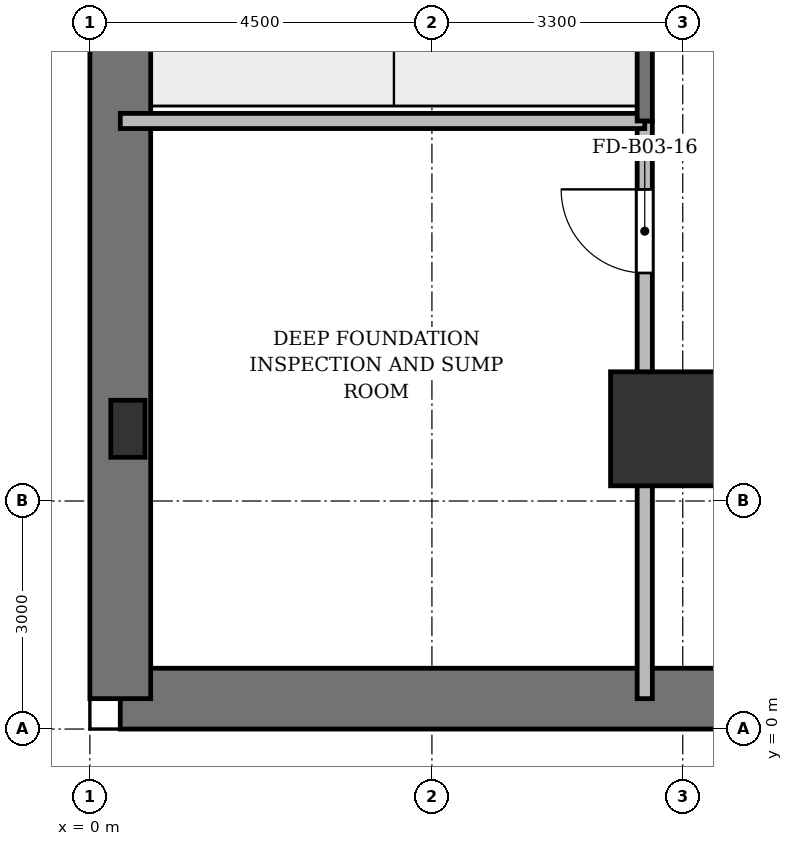
"""IFC4 building model, lengths in metres.
Left out: names, types, materials, properties, quantities, classifications, styles, units other than length and angle.
Written with IfcOpenShell. Run it as: python <this file> out.ifc"""

import sys

from ifc_helpers import new_model, si_unit, direction, frame, frame_2d, origin, origin_2d, place, context, subcontext, project, spatial, rectangle, extrude, source, transform, mapped, element, fill, save


model = new_model("IFC4")
c1 = context("Model", 3, precision=1e-05, world=origin(), true_north=direction((0.0, 1.0)))
c2 = subcontext(c1, "Body", "Model", "MODEL_VIEW")
j1 = project(units=[si_unit("LENGTHUNIT", "METRE"), si_unit("PLANEANGLEUNIT", "RADIAN")], contexts=[c1])
p1 = place(None, origin())
s1 = spatial("IfcSite", under=j1, at=p1, CompositionType="ELEMENT")
p2 = place(p1, origin())
s2 = spatial("IfcBuilding", under=s1, at=p2, CompositionType="ELEMENT")
p3 = place(p2, frame((0.0, 0.0, -13.2)))
s3 = spatial("IfcBuildingStorey", under=s2, at=p3, CompositionType="ELEMENT", Elevation=-13.2)
m1 = source(origin(), c2, "Body", "SweptSolid", [
    extrude(rectangle(XDim=0.45, YDim=0.75, at=origin_2d()), origin(), (0.0, 0.0, 1.0), 4.6),
])
p4 = place(p3, frame((0.5, 3.95, 0.0), z_axis=(0.0, 0.0, 1.0), x_axis=(1.0, 0.0, 0.0)))
e1 = element("IfcColumn", 1, at=p4, inside=s3, PredefinedType="PILASTER", context=c2, shape_type="MappedRepresentation", body=[
    mapped(m1, transform((0.0, 0.0, 0.0), x_axis=(1.0, 0.0, 0.0), y_axis=(0.0, 1.0, 0.0), z_axis=(0.0, 0.0, 1.0), scale=1.0)),
])
m2 = source(origin(), c2, "Body", "SweptSolid", [
    extrude(rectangle(XDim=1.5, YDim=1.5, at=origin_2d()), origin(), (0.0, 0.0, 1.0), 4.6),
])
p5 = place(p3, frame((7.6, 3.95, 0.0), z_axis=(0.0, 0.0, 1.0), x_axis=(1.0, 0.0, 0.0)))
e2 = element("IfcColumn", 2, at=p5, inside=s3, PredefinedType="COLUMN", context=c2, shape_type="MappedRepresentation", body=[
    mapped(m2, transform((0.0, 0.0, 0.0), x_axis=(1.0, 0.0, 0.0), y_axis=(0.0, 1.0, 0.0), z_axis=(0.0, 0.0, 1.0), scale=1.0)),
])
p6 = place(p3, frame((0.4, 0.4, 0.0), z_axis=(0.0, 0.0, 1.0), x_axis=(1.0, 0.0, 0.0)))
e3 = element("IfcWall", 3, at=p6, inside=s3, PredefinedType="USERDEFINED", context=c2, shape_type="SweptSolid", body=[
    extrude(rectangle(XDim=73.6, YDim=0.8, at=frame_2d((36.8, 0.0))), origin(), (0.0, 0.0, 1.0), 4.28),
])
p7 = place(p3, frame((0.4, 51.2, 0.0), z_axis=(0.0, 0.0, 1.0), x_axis=(0.0, -1.0, 0.0)))
e4 = element("IfcWall", 4, at=p7, inside=s3, PredefinedType="USERDEFINED", context=c2, shape_type="SweptSolid", body=[
    extrude(rectangle(XDim=50.8, YDim=0.8, at=frame_2d((25.4, 0.0))), origin(), (0.0, 0.0, 1.0), 4.28),
])
p8 = place(p3, frame((7.3, 0.4, 0.0), z_axis=(0.0, 0.0, 1.0), x_axis=(0.0, 1.0, 0.0)))
e5 = element("IfcWall", 5, at=p8, inside=s3, PredefinedType="PARTITIONING", context=c2, shape_type="SweptSolid", body=[
    extrude(rectangle(XDim=7.6, YDim=0.2, at=frame_2d((3.8, 0.0))), origin(), (0.0, 0.0, 1.0), 3.38),
])
p9 = place(p8, frame((5.6, 0.0, 0.0)))
e6 = element("IfcOpeningElement", 6, at=p9, cuts=e5, PredefinedType="OPENING", context=c2, shape_type="SweptSolid", body=[
    extrude(rectangle(XDim=1.1, YDim=2.15, at=frame_2d((0.55, 1.075))), frame((0.0, 0.11, 0.0), z_axis=(0.0, -1.0, 0.0), x_axis=(1.0, 0.0, 0.0)), (0.0, 0.0, 1.0), 0.22),
])
p10 = place(p3, frame((0.4, 8.0, 0.0), z_axis=(0.0, 0.0, 1.0), x_axis=(1.0, 0.0, 0.0)))
e7 = element("IfcWall", 7, at=p10, inside=s3, PredefinedType="PARTITIONING", context=c2, shape_type="SweptSolid", body=[
    extrude(rectangle(XDim=6.9, YDim=0.2, at=frame_2d((3.45, 0.0))), origin(), (0.0, 0.0, 1.0), 4.28),
])
p11 = place(p3, frame((7.3, 8.0, 0.0), z_axis=(0.0, 0.0, 1.0), x_axis=(0.0, 1.0, 0.0)))
e8 = element("IfcWall", 8, at=p11, inside=s3, PredefinedType="SHEAR", context=c2, shape_type="SweptSolid", body=[
    extrude(rectangle(XDim=36.45, YDim=0.2, at=frame_2d((18.225, 0.0))), origin(), (0.0, 0.0, 1.0), 4.28),
])
m3 = source(origin(), c2, "Body", "SweptSolid", [
    extrude(rectangle(XDim=1.1, YDim=2.15, at=frame_2d((0.55, 1.075))), frame((0.0, 0.025, 0.0), z_axis=(0.0, -1.0, 0.0), x_axis=(1.0, 0.0, 0.0)), (0.0, 0.0, 1.0), 0.05),
])
p12 = place(p9, origin())
e9 = element("IfcDoor", 9, at=p12, inside=s3, OperationType="SINGLE_SWING_RIGHT", PredefinedType="DOOR", context=c2, shape_type="MappedRepresentation", body=[
    mapped(m3, transform((0.0, 0.0, 0.0), x_axis=(1.0, 0.0, 0.0), y_axis=(0.0, 1.0, 0.0), z_axis=(0.0, 0.0, 1.0), scale=1.0)),
])
fill(e6, e9)
save(model, sys.argv[1])
